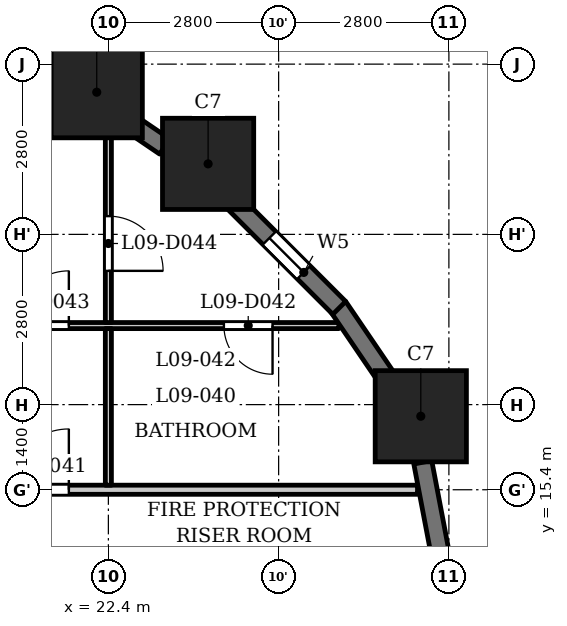
"""IFC4 building model, lengths in metres.
Left out: names, types, materials, properties, quantities, classifications, styles, units other than length and angle.
Written with IfcOpenShell. Run it as: python <this file> out.ifc"""

import sys

from ifc_helpers import new_model, si_unit, direction, frame, frame_2d, origin, origin_2d, place, context, subcontext, project, spatial, rectangle, extrude, element, fill, save


model = new_model("IFC4")
c1 = context("Model", 3, precision=1e-05, world=origin(), true_north=direction((0.0, 1.0)))
c2 = subcontext(c1, "Body", "Model", "MODEL_VIEW")
j1 = project(units=[si_unit("LENGTHUNIT", "METRE"), si_unit("PLANEANGLEUNIT", "RADIAN")], contexts=[c1])
p1 = place(None, origin())
s1 = spatial("IfcSite", under=j1, at=p1, CompositionType="ELEMENT")
p2 = place(p1, origin())
s2 = spatial("IfcBuilding", under=s1, at=p2, CompositionType="ELEMENT")
p3 = place(p2, frame((0.0, 0.0, 41.0)))
s3 = spatial("IfcBuildingStorey", under=s2, at=p3, CompositionType="ELEMENT", Elevation=41.0)
for number, where, z_axis, x_axis in (
    (1, (27.538, 16.609, 0.0), (0.0, 0.0, 1.0), (1.0, 0.0, 0.0)),
    (2, (24.04, 20.76, 0.0), (0.0, 0.0, 1.0), (1.0, 0.0, 0.0)),
    (3, (22.209, 21.938, 0.0), (0.0, 0.0, 1.0), (1.0, 0.0, 0.0)),
):
    element("IfcColumn", number, at=place(p3, frame(where, z_axis=z_axis, x_axis=x_axis)), inside=s3, PredefinedType="COLUMN", context=c2, shape_type="SweptSolid", body=[
        extrude(rectangle(XDim=1.5, YDim=1.5, at=origin_2d()), origin(), (0.0, 0.0, 1.0), 3.5),
    ])
for number, where, z_axis, x_axis in (
    (4, (27.853, 14.372, 0.0), (0.0, 0.0, 1.0), (-0.187, 0.982, 0.0)),
    (5, (27.025, 17.167, 0.0), (0.0, 0.0, 1.0), (-0.562, 0.827, 0.0)),
):
    element("IfcWall", number, at=place(p3, frame(where, z_axis=z_axis, x_axis=x_axis)), inside=s3, PredefinedType="SOLIDWALL", context=c2, shape_type="SweptSolid", body=[
        extrude(rectangle(XDim=1.506, YDim=0.3, at=frame_2d((0.753, 0.0))), origin(), (0.0, 0.0, 1.0), 2.35),
    ])
p4 = place(p3, frame((26.197, 18.391, 0.0), z_axis=(0.0, 0.0, 1.0), x_axis=(-0.707106781187, 0.707106781187, 0.0)))
e6 = element("IfcWall", 6, at=p4, inside=s3, PredefinedType="SOLIDWALL", context=c2, shape_type="SweptSolid", body=[
    extrude(rectangle(XDim=2.45, YDim=0.3, at=frame_2d((1.225, 0.0))), origin(), (0.0, 0.0, 1.0), 2.35),
])
p5 = place(p4, frame((0.825, 0.0, 0.6)))
e7 = element("IfcOpeningElement", 7, at=p5, cuts=e6, PredefinedType="OPENING", context=c2, shape_type="SweptSolid", body=[
    extrude(rectangle(XDim=0.8, YDim=1.55, at=frame_2d((0.4, 0.775))), frame((0.0, 0.16, 0.0), z_axis=(0.0, -1.0, 0.0), x_axis=(1.0, 0.0, 0.0)), (0.0, 0.0, 1.0), 0.32),
])
p6 = place(p3, frame((23.327, 21.045, 0.0), z_axis=(0.0, 0.0, 1.0), x_axis=(-0.827080706709, 0.562083182981, 0.0)))
e8 = element("IfcWall", 8, at=p6, inside=s3, PredefinedType="SOLIDWALL", context=c2, shape_type="SweptSolid", body=[
    extrude(rectangle(XDim=0.677, YDim=0.3, at=frame_2d((0.339, 0.0))), origin(), (0.0, 0.0, 1.0), 3.2),
])
p7 = place(p3, frame((21.451, 21.97, 0.0), z_axis=(0.0, 0.0, 1.0), x_axis=(-0.982287454367, 0.187380247071, 0.0)))
e9 = element("IfcWall", 9, at=p7, inside=s3, PredefinedType="SOLIDWALL", context=c2, shape_type="SweptSolid", body=[
    extrude(rectangle(XDim=1.506, YDim=0.3, at=frame_2d((0.753, 0.0))), origin(), (0.0, 0.0, 1.0), 2.35),
])
p8 = place(p3, frame((-27.484, 15.4, 0.0), z_axis=(0.0, 0.0, 1.0), x_axis=(1.0, 0.0, 0.0)))
e10 = element("IfcWall", 10, at=p8, inside=s3, PredefinedType="PARTITIONING", context=c2, shape_type="SweptSolid", body=[
    extrude(rectangle(XDim=54.968, YDim=0.15, at=frame_2d((27.484, 0.0))), origin(), (0.0, 0.0, 1.0), 3.2),
])
p9 = place(p8, frame((8.784, 0.0, 0.0)))
e11 = element("IfcOpeningElement", 11, at=p9, cuts=e10, PredefinedType="OPENING", context=c2, shape_type="SweptSolid", body=[
    extrude(rectangle(XDim=1.0, YDim=2.1, at=frame_2d((0.5, 1.05))), frame((0.0, 0.085, 0.0), z_axis=(0.0, -1.0, 0.0), x_axis=(1.0, 0.0, 0.0)), (0.0, 0.0, 1.0), 0.17),
])
p10 = place(p8, frame((14.634, 0.0, 0.0)))
e12 = element("IfcOpeningElement", 12, at=p10, cuts=e10, PredefinedType="OPENING", context=c2, shape_type="SweptSolid", body=[
    extrude(rectangle(XDim=1.0, YDim=2.1, at=frame_2d((0.5, 1.05))), frame((0.0, 0.085, 0.0), z_axis=(0.0, -1.0, 0.0), x_axis=(1.0, 0.0, 0.0)), (0.0, 0.0, 1.0), 0.17),
])
p11 = place(p8, frame((25.834, 0.0, 0.0)))
e13 = element("IfcOpeningElement", 13, at=p11, cuts=e10, PredefinedType="OPENING", context=c2, shape_type="SweptSolid", body=[
    extrude(rectangle(XDim=1.0, YDim=2.1, at=frame_2d((0.5, 1.05))), frame((0.0, 0.085, 0.0), z_axis=(0.0, -1.0, 0.0), x_axis=(1.0, 0.0, 0.0)), (0.0, 0.0, 1.0), 0.17),
])
p12 = place(p8, frame((30.184, 0.0, 0.0)))
e14 = element("IfcOpeningElement", 14, at=p12, cuts=e10, PredefinedType="OPENING", context=c2, shape_type="SweptSolid", body=[
    extrude(rectangle(XDim=1.0, YDim=2.1, at=frame_2d((0.5, 1.05))), frame((0.0, 0.085, 0.0), z_axis=(0.0, -1.0, 0.0), x_axis=(1.0, 0.0, 0.0)), (0.0, 0.0, 1.0), 0.17),
])
p13 = place(p8, frame((37.034, 0.0, 0.0)))
e15 = element("IfcOpeningElement", 15, at=p13, cuts=e10, PredefinedType="OPENING", context=c2, shape_type="SweptSolid", body=[
    extrude(rectangle(XDim=1.0, YDim=2.1, at=frame_2d((0.5, 1.05))), frame((0.0, 0.085, 0.0), z_axis=(0.0, -1.0, 0.0), x_axis=(1.0, 0.0, 0.0)), (0.0, 0.0, 1.0), 0.17),
])
p14 = place(p8, frame((48.234, 0.0, 0.0)))
e16 = element("IfcOpeningElement", 16, at=p14, cuts=e10, PredefinedType="OPENING", context=c2, shape_type="SweptSolid", body=[
    extrude(rectangle(XDim=1.0, YDim=2.1, at=frame_2d((0.5, 1.05))), frame((0.0, 0.085, 0.0), z_axis=(0.0, -1.0, 0.0), x_axis=(1.0, 0.0, 0.0)), (0.0, 0.0, 1.0), 0.17),
])
p15 = place(p3, frame((-26.44, 18.1, 0.0), z_axis=(0.0, 0.0, 1.0), x_axis=(1.0, 0.0, 0.0)))
e17 = element("IfcWall", 17, at=p15, inside=s3, PredefinedType="PARTITIONING", context=c2, shape_type="SweptSolid", body=[
    extrude(rectangle(XDim=52.63, YDim=0.1, at=frame_2d((26.315, 0.0))), origin(), (0.0, 0.0, 1.0), 3.2),
])
p16 = place(p15, frame((2.626, 0.0, 0.0)))
e18 = element("IfcOpeningElement", 18, at=p16, cuts=e17, PredefinedType="OPENING", context=c2, shape_type="SweptSolid", body=[
    extrude(rectangle(XDim=0.8, YDim=2.1, at=frame_2d((0.4, 1.05))), frame((0.0, 0.06, 0.0), z_axis=(0.0, -1.0, 0.0), x_axis=(1.0, 0.0, 0.0)), (0.0, 0.0, 1.0), 0.12),
])
p17 = place(p15, frame((7.84, 0.0, 0.0)))
e19 = element("IfcOpeningElement", 19, at=p17, cuts=e17, PredefinedType="OPENING", context=c2, shape_type="SweptSolid", body=[
    extrude(rectangle(XDim=0.9, YDim=2.1, at=frame_2d((0.45, 1.05))), frame((0.0, 0.06, 0.0), z_axis=(0.0, -1.0, 0.0), x_axis=(1.0, 0.0, 0.0)), (0.0, 0.0, 1.0), 0.12),
])
p18 = place(p15, frame((18.49, 0.0, 0.0)))
e20 = element("IfcOpeningElement", 20, at=p18, cuts=e17, PredefinedType="OPENING", context=c2, shape_type="SweptSolid", body=[
    extrude(rectangle(XDim=0.8, YDim=2.1, at=frame_2d((0.4, 1.05))), frame((0.0, 0.06, 0.0), z_axis=(0.0, -1.0, 0.0), x_axis=(1.0, 0.0, 0.0)), (0.0, 0.0, 1.0), 0.12),
])
p19 = place(p15, frame((16.54, 0.0, 0.0)))
e21 = element("IfcOpeningElement", 21, at=p19, cuts=e17, PredefinedType="OPENING", context=c2, shape_type="SweptSolid", body=[
    extrude(rectangle(XDim=0.9, YDim=2.1, at=frame_2d((0.45, 1.05))), frame((0.0, 0.06, 0.0), z_axis=(0.0, -1.0, 0.0), x_axis=(1.0, 0.0, 0.0)), (0.0, 0.0, 1.0), 0.12),
])
p20 = place(p15, frame((10.89, 0.0, 0.0)))
e22 = element("IfcOpeningElement", 22, at=p20, cuts=e17, PredefinedType="OPENING", context=c2, shape_type="SweptSolid", body=[
    extrude(rectangle(XDim=0.9, YDim=2.1, at=frame_2d((0.45, 1.05))), frame((0.0, 0.06, 0.0), z_axis=(0.0, -1.0, 0.0), x_axis=(1.0, 0.0, 0.0)), (0.0, 0.0, 1.0), 0.12),
])
p21 = place(p15, frame((12.94, 0.0, 0.0)))
e23 = element("IfcOpeningElement", 23, at=p21, cuts=e17, PredefinedType="OPENING", context=c2, shape_type="SweptSolid", body=[
    extrude(rectangle(XDim=0.9, YDim=2.1, at=frame_2d((0.45, 1.05))), frame((0.0, 0.06, 0.0), z_axis=(0.0, -1.0, 0.0), x_axis=(1.0, 0.0, 0.0)), (0.0, 0.0, 1.0), 0.12),
])
p22 = place(p15, frame((21.49, 0.0, 0.0)))
e24 = element("IfcOpeningElement", 24, at=p22, cuts=e17, PredefinedType="OPENING", context=c2, shape_type="SweptSolid", body=[
    extrude(rectangle(XDim=0.8, YDim=2.1, at=frame_2d((0.4, 1.05))), frame((0.0, 0.06, 0.0), z_axis=(0.0, -1.0, 0.0), x_axis=(1.0, 0.0, 0.0)), (0.0, 0.0, 1.0), 0.12),
])
p23 = place(p15, frame((24.89, 0.0, 0.0)))
e25 = element("IfcOpeningElement", 25, at=p23, cuts=e17, PredefinedType="OPENING", context=c2, shape_type="SweptSolid", body=[
    extrude(rectangle(XDim=0.9, YDim=2.1, at=frame_2d((0.45, 1.05))), frame((0.0, 0.06, 0.0), z_axis=(0.0, -1.0, 0.0), x_axis=(1.0, 0.0, 0.0)), (0.0, 0.0, 1.0), 0.12),
])
p24 = place(p15, frame((27.09, 0.0, 0.0)))
e26 = element("IfcOpeningElement", 26, at=p24, cuts=e17, PredefinedType="OPENING", context=c2, shape_type="SweptSolid", body=[
    extrude(rectangle(XDim=0.8, YDim=2.1, at=frame_2d((0.4, 1.05))), frame((0.0, 0.06, 0.0), z_axis=(0.0, -1.0, 0.0), x_axis=(1.0, 0.0, 0.0)), (0.0, 0.0, 1.0), 0.12),
])
p25 = place(p15, frame((28.99, 0.0, 0.0)))
e27 = element("IfcOpeningElement", 27, at=p25, cuts=e17, PredefinedType="OPENING", context=c2, shape_type="SweptSolid", body=[
    extrude(rectangle(XDim=0.9, YDim=2.1, at=frame_2d((0.45, 1.05))), frame((0.0, 0.06, 0.0), z_axis=(0.0, -1.0, 0.0), x_axis=(1.0, 0.0, 0.0)), (0.0, 0.0, 1.0), 0.12),
])
p26 = place(p15, frame((41.69, 0.0, 0.0)))
e28 = element("IfcOpeningElement", 28, at=p26, cuts=e17, PredefinedType="OPENING", context=c2, shape_type="SweptSolid", body=[
    extrude(rectangle(XDim=0.8, YDim=2.1, at=frame_2d((0.4, 1.05))), frame((0.0, 0.06, 0.0), z_axis=(0.0, -1.0, 0.0), x_axis=(1.0, 0.0, 0.0)), (0.0, 0.0, 1.0), 0.12),
])
p27 = place(p15, frame((38.99, 0.0, 0.0)))
e29 = element("IfcOpeningElement", 29, at=p27, cuts=e17, PredefinedType="OPENING", context=c2, shape_type="SweptSolid", body=[
    extrude(rectangle(XDim=0.9, YDim=2.1, at=frame_2d((0.45, 1.05))), frame((0.0, 0.06, 0.0), z_axis=(0.0, -1.0, 0.0), x_axis=(1.0, 0.0, 0.0)), (0.0, 0.0, 1.0), 0.12),
])
p28 = place(p15, frame((33.29, 0.0, 0.0)))
e30 = element("IfcOpeningElement", 30, at=p28, cuts=e17, PredefinedType="OPENING", context=c2, shape_type="SweptSolid", body=[
    extrude(rectangle(XDim=0.9, YDim=2.1, at=frame_2d((0.45, 1.05))), frame((0.0, 0.06, 0.0), z_axis=(0.0, -1.0, 0.0), x_axis=(1.0, 0.0, 0.0)), (0.0, 0.0, 1.0), 0.12),
])
p29 = place(p15, frame((35.34, 0.0, 0.0)))
e31 = element("IfcOpeningElement", 31, at=p29, cuts=e17, PredefinedType="OPENING", context=c2, shape_type="SweptSolid", body=[
    extrude(rectangle(XDim=0.9, YDim=2.1, at=frame_2d((0.45, 1.05))), frame((0.0, 0.06, 0.0), z_axis=(0.0, -1.0, 0.0), x_axis=(1.0, 0.0, 0.0)), (0.0, 0.0, 1.0), 0.12),
])
p30 = place(p15, frame((50.74, 0.0, 0.0)))
e32 = element("IfcOpeningElement", 32, at=p30, cuts=e17, PredefinedType="OPENING", context=c2, shape_type="SweptSolid", body=[
    extrude(rectangle(XDim=0.8, YDim=2.1, at=frame_2d((0.4, 1.05))), frame((0.0, 0.06, 0.0), z_axis=(0.0, -1.0, 0.0), x_axis=(1.0, 0.0, 0.0)), (0.0, 0.0, 1.0), 0.12),
])
p31 = place(p15, frame((47.29, 0.0, 0.0)))
e33 = element("IfcOpeningElement", 33, at=p31, cuts=e17, PredefinedType="OPENING", context=c2, shape_type="SweptSolid", body=[
    extrude(rectangle(XDim=0.9, YDim=2.1, at=frame_2d((0.45, 1.05))), frame((0.0, 0.06, 0.0), z_axis=(0.0, -1.0, 0.0), x_axis=(1.0, 0.0, 0.0)), (0.0, 0.0, 1.0), 0.12),
])
p32 = place(p3, frame((22.4, 15.475, 0.0), z_axis=(0.0, 0.0, 1.0), x_axis=(0.0, 1.0, 0.0)))
e34 = element("IfcWall", 34, at=p32, inside=s3, PredefinedType="PARTITIONING", context=c2, shape_type="SweptSolid", body=[
    extrude(rectangle(XDim=2.575, YDim=0.1, at=frame_2d((1.288, 0.0))), origin(), (0.0, 0.0, 1.0), 3.2),
])
p33 = place(p3, frame((22.4, 18.15, 0.0), z_axis=(0.0, 0.0, 1.0), x_axis=(0.0, 1.0, 0.0)))
e35 = element("IfcWall", 35, at=p33, inside=s3, PredefinedType="PARTITIONING", context=c2, shape_type="SweptSolid", body=[
    extrude(rectangle(XDim=3.57, YDim=0.1, at=frame_2d((1.785, 0.0))), origin(), (0.0, 0.0, 1.0), 3.2),
])
p34 = place(p33, frame((0.85, 0.0, 0.0)))
e36 = element("IfcOpeningElement", 36, at=p34, cuts=e35, PredefinedType="OPENING", context=c2, shape_type="SweptSolid", body=[
    extrude(rectangle(XDim=0.9, YDim=2.1, at=frame_2d((0.45, 1.05))), frame((0.0, 0.06, 0.0), z_axis=(0.0, -1.0, 0.0), x_axis=(1.0, 0.0, 0.0)), (0.0, 0.0, 1.0), 0.12),
])
p35 = place(p14, origin())
e37 = element("IfcDoor", 37, at=p35, inside=s3, OperationType="SINGLE_SWING_LEFT", PredefinedType="DOOR", context=c2, shape_type="SweptSolid", body=[
    extrude(rectangle(XDim=1.0, YDim=2.1, at=frame_2d((0.5, 1.05))), frame((0.0, 0.025, 0.0), z_axis=(0.0, -1.0, 0.0), x_axis=(1.0, 0.0, 0.0)), (0.0, 0.0, 1.0), 0.05),
])
fill(e16, e37)
p36 = place(p30, origin())
e38 = element("IfcDoor", 38, at=p36, inside=s3, OperationType="SINGLE_SWING_RIGHT", PredefinedType="DOOR", context=c2, shape_type="SweptSolid", body=[
    extrude(rectangle(XDim=0.8, YDim=2.1, at=frame_2d((0.4, 1.05))), frame((0.0, 0.025, 0.0), z_axis=(0.0, -1.0, 0.0), x_axis=(1.0, 0.0, 0.0)), (0.0, 0.0, 1.0), 0.05),
])
fill(e32, e38)
p37 = place(p31, origin())
e39 = element("IfcDoor", 39, at=p37, inside=s3, OperationType="SINGLE_SWING_LEFT", PredefinedType="DOOR", context=c2, shape_type="SweptSolid", body=[
    extrude(rectangle(XDim=0.9, YDim=2.1, at=frame_2d((0.45, 1.05))), frame((0.0, 0.025, 0.0), z_axis=(0.0, -1.0, 0.0), x_axis=(1.0, 0.0, 0.0)), (0.0, 0.0, 1.0), 0.05),
])
fill(e33, e39)
p38 = place(p34, origin())
e40 = element("IfcDoor", 40, at=p38, inside=s3, OperationType="SINGLE_SWING_LEFT", PredefinedType="DOOR", context=c2, shape_type="SweptSolid", body=[
    extrude(rectangle(XDim=0.9, YDim=2.1, at=frame_2d((0.45, 1.05))), frame((0.0, 0.025, 0.0), z_axis=(0.0, -1.0, 0.0), x_axis=(1.0, 0.0, 0.0)), (0.0, 0.0, 1.0), 0.05),
])
fill(e36, e40)
p39 = place(p5, origin())
e41 = element("IfcWindow", 41, at=p39, inside=s3, PartitioningType="SINGLE_PANEL", PredefinedType="WINDOW", context=c2, shape_type="SweptSolid", body=[
    extrude(rectangle(XDim=0.8, YDim=1.55, at=frame_2d((0.4, 0.775))), frame((0.0, 0.03, 0.0), z_axis=(0.0, -1.0, 0.0), x_axis=(1.0, 0.0, 0.0)), (0.0, 0.0, 1.0), 0.06),
])
fill(e7, e41)
save(model, sys.argv[1])
